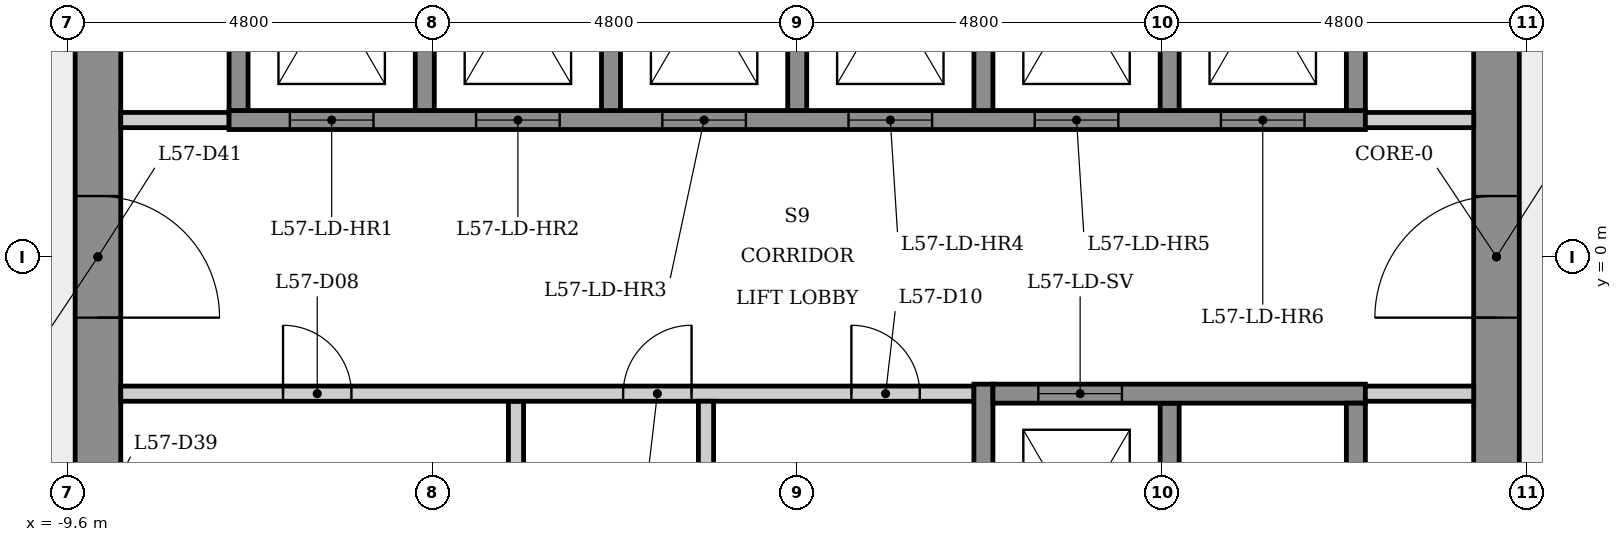
"""IFC4 building model, lengths in metres.
Left out: names, types, materials, properties, quantities, classifications, styles, units other than length and angle.
Written with IfcOpenShell. Run it as: python <this file> out.ifc"""

import sys

from ifc_helpers import new_model, si_unit, direction, frame, frame_2d, origin, place, context, subcontext, project, spatial, rectangle, extrude, element, fill, save


model = new_model("IFC4")
c1 = context("Model", 3, precision=1e-05, world=origin(), true_north=direction((0.0, 1.0)))
c2 = subcontext(c1, "Body", "Model", "MODEL_VIEW")
j1 = project(units=[si_unit("LENGTHUNIT", "METRE"), si_unit("PLANEANGLEUNIT", "RADIAN")], contexts=[c1])
p1 = place(None, origin())
s1 = spatial("IfcSite", under=j1, at=p1, CompositionType="ELEMENT")
p2 = place(p1, origin())
s2 = spatial("IfcBuilding", under=s1, at=p2, CompositionType="ELEMENT")
p3 = place(p2, frame((0.0, 0.0, 214.1)))
s3 = spatial("IfcBuildingStorey", under=s2, at=p3, CompositionType="ELEMENT", Elevation=214.1)
p4 = place(p3, frame((9.2, -5.485, 0.0), z_axis=(0.0, 0.0, 1.0), x_axis=(0.0, 1.0, 0.0)))
e1 = element("IfcWall", 1, at=p4, inside=s3, PredefinedType="SHEAR", context=c2, shape_type="SweptSolid", body=[
    extrude(rectangle(XDim=10.97, YDim=0.6, at=frame_2d((5.485, 0.0))), origin(), (0.0, 0.0, 1.0), 4.8),
])
p5 = place(p4, frame((4.685, 0.0, 0.0)))
e2 = element("IfcOpeningElement", 2, at=p5, cuts=e1, PredefinedType="OPENING", context=c2, shape_type="SweptSolid", body=[
    extrude(rectangle(XDim=1.6, YDim=2.1, at=frame_2d((0.8, 1.05))), frame((0.0, 0.31, 0.0), z_axis=(0.0, -1.0, 0.0), x_axis=(1.0, 0.0, 0.0)), (0.0, 0.0, 1.0), 0.62),
])
p6 = place(p3, frame((-9.2, 5.485, 0.0), z_axis=(0.0, 0.0, 1.0), x_axis=(0.0, -1.0, 0.0)))
e3 = element("IfcWall", 3, at=p6, inside=s3, PredefinedType="SHEAR", context=c2, shape_type="SweptSolid", body=[
    extrude(rectangle(XDim=10.97, YDim=0.6, at=frame_2d((5.485, 0.0))), origin(), (0.0, 0.0, 1.0), 4.8),
])
p7 = place(p6, frame((8.516, 0.0, 0.0)))
e4 = element("IfcOpeningElement", 4, at=p7, cuts=e3, PredefinedType="OPENING", context=c2, shape_type="SweptSolid", body=[
    extrude(rectangle(XDim=0.9, YDim=2.1, at=frame_2d((0.45, 1.05))), frame((0.0, 0.31, 0.0), z_axis=(0.0, -1.0, 0.0), x_axis=(1.0, 0.0, 0.0)), (0.0, 0.0, 1.0), 0.62),
])
p8 = place(p6, frame((4.685, 0.0, 0.0)))
e5 = element("IfcOpeningElement", 5, at=p8, cuts=e3, PredefinedType="OPENING", context=c2, shape_type="SweptSolid", body=[
    extrude(rectangle(XDim=1.6, YDim=2.1, at=frame_2d((0.8, 1.05))), frame((0.0, 0.31, 0.0), z_axis=(0.0, -1.0, 0.0), x_axis=(1.0, 0.0, 0.0)), (0.0, 0.0, 1.0), 0.62),
])
p9 = place(p3, frame((-8.9, 1.8, 0.0), z_axis=(0.0, 0.0, 1.0), x_axis=(1.0, 0.0, 0.0)))
e6 = element("IfcWall", 6, at=p9, inside=s3, PredefinedType="PARTITIONING", context=c2, shape_type="SweptSolid", body=[
    extrude(rectangle(XDim=1.425, YDim=0.2, at=frame_2d((0.712, 0.0))), origin(), (0.0, 0.0, 1.0), 4.45),
])
p10 = place(p3, frame((-7.475, 1.8, 0.0), z_axis=(0.0, 0.0, 1.0), x_axis=(1.0, 0.0, 0.0)))
e7 = element("IfcWall", 7, at=p10, inside=s3, PredefinedType="SHEAR", context=c2, shape_type="SweptSolid", body=[
    extrude(rectangle(XDim=14.95, YDim=0.25, at=frame_2d((7.475, 0.0))), origin(), (0.0, 0.0, 1.0), 4.45),
])
p11 = place(p10, frame((0.8, 0.0, 0.0)))
e8 = element("IfcOpeningElement", 8, at=p11, cuts=e7, PredefinedType="OPENING", context=c2, shape_type="SweptSolid", body=[
    extrude(rectangle(XDim=1.1, YDim=2.1, at=frame_2d((0.55, 1.05))), frame((0.0, 0.135, 0.0), z_axis=(0.0, -1.0, 0.0), x_axis=(1.0, 0.0, 0.0)), (0.0, 0.0, 1.0), 0.27),
])
p12 = place(p10, frame((3.25, 0.0, 0.0)))
e9 = element("IfcOpeningElement", 9, at=p12, cuts=e7, PredefinedType="OPENING", context=c2, shape_type="SweptSolid", body=[
    extrude(rectangle(XDim=1.1, YDim=2.1, at=frame_2d((0.55, 1.05))), frame((0.0, 0.135, 0.0), z_axis=(0.0, -1.0, 0.0), x_axis=(1.0, 0.0, 0.0)), (0.0, 0.0, 1.0), 0.27),
])
p13 = place(p10, frame((5.7, 0.0, 0.0)))
e10 = element("IfcOpeningElement", 10, at=p13, cuts=e7, PredefinedType="OPENING", context=c2, shape_type="SweptSolid", body=[
    extrude(rectangle(XDim=1.1, YDim=2.1, at=frame_2d((0.55, 1.05))), frame((0.0, 0.135, 0.0), z_axis=(0.0, -1.0, 0.0), x_axis=(1.0, 0.0, 0.0)), (0.0, 0.0, 1.0), 0.27),
])
p14 = place(p10, frame((8.15, 0.0, 0.0)))
e11 = element("IfcOpeningElement", 11, at=p14, cuts=e7, PredefinedType="OPENING", context=c2, shape_type="SweptSolid", body=[
    extrude(rectangle(XDim=1.1, YDim=2.1, at=frame_2d((0.55, 1.05))), frame((0.0, 0.135, 0.0), z_axis=(0.0, -1.0, 0.0), x_axis=(1.0, 0.0, 0.0)), (0.0, 0.0, 1.0), 0.27),
])
p15 = place(p10, frame((10.6, 0.0, 0.0)))
e12 = element("IfcOpeningElement", 12, at=p15, cuts=e7, PredefinedType="OPENING", context=c2, shape_type="SweptSolid", body=[
    extrude(rectangle(XDim=1.1, YDim=2.1, at=frame_2d((0.55, 1.05))), frame((0.0, 0.135, 0.0), z_axis=(0.0, -1.0, 0.0), x_axis=(1.0, 0.0, 0.0)), (0.0, 0.0, 1.0), 0.27),
])
p16 = place(p10, frame((13.05, 0.0, 0.0)))
e13 = element("IfcOpeningElement", 13, at=p16, cuts=e7, PredefinedType="OPENING", context=c2, shape_type="SweptSolid", body=[
    extrude(rectangle(XDim=1.1, YDim=2.1, at=frame_2d((0.55, 1.05))), frame((0.0, 0.135, 0.0), z_axis=(0.0, -1.0, 0.0), x_axis=(1.0, 0.0, 0.0)), (0.0, 0.0, 1.0), 0.27),
])
p17 = place(p3, frame((-7.35, 1.925, 0.0), z_axis=(0.0, 0.0, 1.0), x_axis=(0.0, 1.0, 0.0)))
e14 = element("IfcWall", 14, at=p17, inside=s3, PredefinedType="SHEAR", context=c2, shape_type="SweptSolid", body=[
    extrude(rectangle(XDim=4.036, YDim=0.25, at=frame_2d((2.018, 0.0))), origin(), (0.0, 0.0, 1.0), 4.45),
])
p18 = place(p3, frame((-4.9, 5.025, 0.0), z_axis=(0.0, 0.0, 1.0), x_axis=(0.0, -1.0, 0.0)))
e15 = element("IfcWall", 15, at=p18, inside=s3, PredefinedType="SHEAR", context=c2, shape_type="SweptSolid", body=[
    extrude(rectangle(XDim=3.1, YDim=0.25, at=frame_2d((1.55, 0.0))), origin(), (0.0, 0.0, 1.0), 4.8),
])
p19 = place(p3, frame((-3.7, -1.9, 0.0), z_axis=(0.0, 0.0, 1.0), x_axis=(0.0, -1.0, 0.0)))
e16 = element("IfcWall", 16, at=p19, inside=s3, PredefinedType="PARTITIONING", context=c2, shape_type="SweptSolid", body=[
    extrude(rectangle(XDim=3.15, YDim=0.2, at=frame_2d((1.575, 0.0))), origin(), (0.0, 0.0, 1.0), 4.45),
])
p20 = place(p3, frame((-8.9, -1.8, 0.0), z_axis=(0.0, 0.0, 1.0), x_axis=(1.0, 0.0, 0.0)))
e17 = element("IfcWall", 17, at=p20, inside=s3, PredefinedType="PARTITIONING", context=c2, shape_type="SweptSolid", body=[
    extrude(rectangle(XDim=11.225, YDim=0.2, at=frame_2d((5.613, 0.0))), origin(), (0.0, 0.0, 1.0), 4.45),
])
p21 = place(p20, frame((2.135, 0.0, 0.0)))
e18 = element("IfcOpeningElement", 18, at=p21, cuts=e17, PredefinedType="OPENING", context=c2, shape_type="SweptSolid", body=[
    extrude(rectangle(XDim=0.9, YDim=2.1, at=frame_2d((0.45, 1.05))), frame((0.0, 0.11, 0.0), z_axis=(0.0, -1.0, 0.0), x_axis=(1.0, 0.0, 0.0)), (0.0, 0.0, 1.0), 0.22),
])
p22 = place(p20, frame((6.61, 0.0, 0.0)))
e19 = element("IfcOpeningElement", 19, at=p22, cuts=e17, PredefinedType="OPENING", context=c2, shape_type="SweptSolid", body=[
    extrude(rectangle(XDim=0.9, YDim=2.1, at=frame_2d((0.45, 1.05))), frame((0.0, 0.11, 0.0), z_axis=(0.0, -1.0, 0.0), x_axis=(1.0, 0.0, 0.0)), (0.0, 0.0, 1.0), 0.22),
])
p23 = place(p20, frame((9.613, 0.0, 0.0)))
e20 = element("IfcOpeningElement", 20, at=p23, cuts=e17, PredefinedType="OPENING", context=c2, shape_type="SweptSolid", body=[
    extrude(rectangle(XDim=0.9, YDim=2.1, at=frame_2d((0.45, 1.05))), frame((0.0, 0.11, 0.0), z_axis=(0.0, -1.0, 0.0), x_axis=(1.0, 0.0, 0.0)), (0.0, 0.0, 1.0), 0.22),
])
p24 = place(p3, frame((-2.45, 5.025, 0.0), z_axis=(0.0, 0.0, 1.0), x_axis=(0.0, -1.0, 0.0)))
e21 = element("IfcWall", 21, at=p24, inside=s3, PredefinedType="SHEAR", context=c2, shape_type="SweptSolid", body=[
    extrude(rectangle(XDim=3.1, YDim=0.25, at=frame_2d((1.55, 0.0))), origin(), (0.0, 0.0, 1.0), 4.8),
])
p25 = place(p3, frame((-1.2, -1.9, 0.0), z_axis=(0.0, 0.0, 1.0), x_axis=(0.0, -1.0, 0.0)))
e22 = element("IfcWall", 22, at=p25, inside=s3, PredefinedType="PARTITIONING", context=c2, shape_type="SweptSolid", body=[
    extrude(rectangle(XDim=3.15, YDim=0.2, at=frame_2d((1.575, 0.0))), origin(), (0.0, 0.0, 1.0), 4.45),
])
p26 = place(p3, frame((0.0, 5.025, 0.0), z_axis=(0.0, 0.0, 1.0), x_axis=(0.0, -1.0, 0.0)))
e23 = element("IfcWall", 23, at=p26, inside=s3, PredefinedType="SHEAR", context=c2, shape_type="SweptSolid", body=[
    extrude(rectangle(XDim=3.1, YDim=0.25, at=frame_2d((1.55, 0.0))), origin(), (0.0, 0.0, 1.0), 4.8),
])
p27 = place(p3, frame((2.45, -5.275, 0.0), z_axis=(0.0, 0.0, 1.0), x_axis=(0.0, 1.0, 0.0)))
e24 = element("IfcWall", 24, at=p27, inside=s3, PredefinedType="SHEAR", context=c2, shape_type="SweptSolid", body=[
    extrude(rectangle(XDim=3.6, YDim=0.25, at=frame_2d((1.8, 0.0))), origin(), (0.0, 0.0, 1.0), 4.45),
])
for number, where, z_axis, x_axis in (
    (25, (2.45, 5.025, 0.0), (0.0, 0.0, 1.0), (0.0, -1.0, 0.0)),
    (26, (4.9, -1.925, 0.0), (0.0, 0.0, 1.0), (0.0, -1.0, 0.0)),
    (27, (4.9, 5.025, 0.0), (0.0, 0.0, 1.0), (0.0, -1.0, 0.0)),
):
    element("IfcWall", number, at=place(p3, frame(where, z_axis=z_axis, x_axis=x_axis)), inside=s3, PredefinedType="SHEAR", context=c2, shape_type="SweptSolid", body=[
        extrude(rectangle(XDim=3.1, YDim=0.25, at=frame_2d((1.55, 0.0))), origin(), (0.0, 0.0, 1.0), 4.8),
    ])
p28 = place(p3, frame((2.575, -1.8, 0.0), z_axis=(0.0, 0.0, 1.0), x_axis=(1.0, 0.0, 0.0)))
e28 = element("IfcWall", 28, at=p28, inside=s3, PredefinedType="SHEAR", context=c2, shape_type="SweptSolid", body=[
    extrude(rectangle(XDim=4.9, YDim=0.25, at=frame_2d((2.45, 0.0))), origin(), (0.0, 0.0, 1.0), 4.45),
])
p29 = place(p28, frame((0.597, 0.0, 0.0)))
e29 = element("IfcOpeningElement", 29, at=p29, cuts=e28, PredefinedType="OPENING", context=c2, shape_type="SweptSolid", body=[
    extrude(rectangle(XDim=1.1, YDim=2.1, at=frame_2d((0.55, 1.05))), frame((0.0, 0.135, 0.0), z_axis=(0.0, -1.0, 0.0), x_axis=(1.0, 0.0, 0.0)), (0.0, 0.0, 1.0), 0.27),
])
p30 = place(p3, frame((7.475, 1.8, 0.0), z_axis=(0.0, 0.0, 1.0), x_axis=(1.0, 0.0, 0.0)))
e30 = element("IfcWall", 30, at=p30, inside=s3, PredefinedType="PARTITIONING", context=c2, shape_type="SweptSolid", body=[
    extrude(rectangle(XDim=1.425, YDim=0.2, at=frame_2d((0.712, 0.0))), origin(), (0.0, 0.0, 1.0), 4.45),
])
for number, where, z_axis, x_axis in (
    (31, (7.35, -1.925, 0.0), (0.0, 0.0, 1.0), (0.0, -1.0, 0.0)),
    (32, (7.35, 5.025, 0.0), (0.0, 0.0, 1.0), (0.0, -1.0, 0.0)),
):
    element("IfcWall", number, at=place(p3, frame(where, z_axis=z_axis, x_axis=x_axis)), inside=s3, PredefinedType="SHEAR", context=c2, shape_type="SweptSolid", body=[
        extrude(rectangle(XDim=3.1, YDim=0.25, at=frame_2d((1.55, 0.0))), origin(), (0.0, 0.0, 1.0), 4.8),
    ])
p31 = place(p3, frame((8.9, -1.8, 0.0), z_axis=(0.0, 0.0, 1.0), x_axis=(-1.0, 0.0, 0.0)))
e33 = element("IfcWall", 33, at=p31, inside=s3, PredefinedType="PARTITIONING", context=c2, shape_type="SweptSolid", body=[
    extrude(rectangle(XDim=1.425, YDim=0.2, at=frame_2d((0.712, 0.0))), origin(), (0.0, 0.0, 1.0), 4.45),
])
p32 = place(p11, origin())
e34 = element("IfcDoor", 34, at=p32, inside=s3, OperationType="SLIDING_TO_LEFT", PredefinedType="DOOR", context=c2, shape_type="SweptSolid", body=[
    extrude(rectangle(XDim=1.1, YDim=2.1, at=frame_2d((0.55, 1.05))), frame((0.0, 0.025, 0.0), z_axis=(0.0, -1.0, 0.0), x_axis=(1.0, 0.0, 0.0)), (0.0, 0.0, 1.0), 0.05),
])
fill(e8, e34)
p33 = place(p12, origin())
e35 = element("IfcDoor", 35, at=p33, inside=s3, OperationType="SLIDING_TO_LEFT", PredefinedType="DOOR", context=c2, shape_type="SweptSolid", body=[
    extrude(rectangle(XDim=1.1, YDim=2.1, at=frame_2d((0.55, 1.05))), frame((0.0, 0.025, 0.0), z_axis=(0.0, -1.0, 0.0), x_axis=(1.0, 0.0, 0.0)), (0.0, 0.0, 1.0), 0.05),
])
fill(e9, e35)
p34 = place(p13, origin())
e36 = element("IfcDoor", 36, at=p34, inside=s3, OperationType="SLIDING_TO_LEFT", PredefinedType="DOOR", context=c2, shape_type="SweptSolid", body=[
    extrude(rectangle(XDim=1.1, YDim=2.1, at=frame_2d((0.55, 1.05))), frame((0.0, 0.025, 0.0), z_axis=(0.0, -1.0, 0.0), x_axis=(1.0, 0.0, 0.0)), (0.0, 0.0, 1.0), 0.05),
])
fill(e10, e36)
p35 = place(p14, origin())
e37 = element("IfcDoor", 37, at=p35, inside=s3, OperationType="SLIDING_TO_LEFT", PredefinedType="DOOR", context=c2, shape_type="SweptSolid", body=[
    extrude(rectangle(XDim=1.1, YDim=2.1, at=frame_2d((0.55, 1.05))), frame((0.0, 0.025, 0.0), z_axis=(0.0, -1.0, 0.0), x_axis=(1.0, 0.0, 0.0)), (0.0, 0.0, 1.0), 0.05),
])
fill(e11, e37)
p36 = place(p15, origin())
e38 = element("IfcDoor", 38, at=p36, inside=s3, OperationType="SLIDING_TO_LEFT", PredefinedType="DOOR", context=c2, shape_type="SweptSolid", body=[
    extrude(rectangle(XDim=1.1, YDim=2.1, at=frame_2d((0.55, 1.05))), frame((0.0, 0.025, 0.0), z_axis=(0.0, -1.0, 0.0), x_axis=(1.0, 0.0, 0.0)), (0.0, 0.0, 1.0), 0.05),
])
fill(e12, e38)
p37 = place(p16, origin())
e39 = element("IfcDoor", 39, at=p37, inside=s3, OperationType="SLIDING_TO_LEFT", PredefinedType="DOOR", context=c2, shape_type="SweptSolid", body=[
    extrude(rectangle(XDim=1.1, YDim=2.1, at=frame_2d((0.55, 1.05))), frame((0.0, 0.025, 0.0), z_axis=(0.0, -1.0, 0.0), x_axis=(1.0, 0.0, 0.0)), (0.0, 0.0, 1.0), 0.05),
])
fill(e13, e39)
p38 = place(p29, origin())
e40 = element("IfcDoor", 40, at=p38, inside=s3, OperationType="SLIDING_TO_LEFT", PredefinedType="DOOR", context=c2, shape_type="SweptSolid", body=[
    extrude(rectangle(XDim=1.1, YDim=2.1, at=frame_2d((0.55, 1.05))), frame((0.0, 0.025, 0.0), z_axis=(0.0, -1.0, 0.0), x_axis=(1.0, 0.0, 0.0)), (0.0, 0.0, 1.0), 0.05),
])
fill(e29, e40)
p39 = place(p21, origin())
e41 = element("IfcDoor", 41, at=p39, inside=s3, OperationType="SINGLE_SWING_LEFT", PredefinedType="DOOR", context=c2, shape_type="SweptSolid", body=[
    extrude(rectangle(XDim=0.9, YDim=2.1, at=frame_2d((0.45, 1.05))), frame((0.0, 0.025, 0.0), z_axis=(0.0, -1.0, 0.0), x_axis=(1.0, 0.0, 0.0)), (0.0, 0.0, 1.0), 0.05),
])
fill(e18, e41)
p40 = place(p22, origin())
e42 = element("IfcDoor", 42, at=p40, inside=s3, OperationType="SINGLE_SWING_RIGHT", PredefinedType="DOOR", context=c2, shape_type="SweptSolid", body=[
    extrude(rectangle(XDim=0.9, YDim=2.1, at=frame_2d((0.45, 1.05))), frame((0.0, 0.025, 0.0), z_axis=(0.0, -1.0, 0.0), x_axis=(1.0, 0.0, 0.0)), (0.0, 0.0, 1.0), 0.05),
])
fill(e19, e42)
p41 = place(p23, origin())
e43 = element("IfcDoor", 43, at=p41, inside=s3, OperationType="SINGLE_SWING_LEFT", PredefinedType="DOOR", context=c2, shape_type="SweptSolid", body=[
    extrude(rectangle(XDim=0.9, YDim=2.1, at=frame_2d((0.45, 1.05))), frame((0.0, 0.025, 0.0), z_axis=(0.0, -1.0, 0.0), x_axis=(1.0, 0.0, 0.0)), (0.0, 0.0, 1.0), 0.05),
])
fill(e20, e43)
p42 = place(p5, origin())
e44 = element("IfcDoor", 44, at=p42, inside=s3, OperationType="SINGLE_SWING_LEFT", PredefinedType="DOOR", context=c2, shape_type="SweptSolid", body=[
    extrude(rectangle(XDim=1.6, YDim=2.1, at=frame_2d((0.8, 1.05))), frame((0.0, 0.025, 0.0), z_axis=(0.0, -1.0, 0.0), x_axis=(1.0, 0.0, 0.0)), (0.0, 0.0, 1.0), 0.05),
])
fill(e2, e44)
p43 = place(p8, origin())
e45 = element("IfcDoor", 45, at=p43, inside=s3, OperationType="SINGLE_SWING_RIGHT", PredefinedType="DOOR", context=c2, shape_type="SweptSolid", body=[
    extrude(rectangle(XDim=1.6, YDim=2.1, at=frame_2d((0.8, 1.05))), frame((0.0, 0.025, 0.0), z_axis=(0.0, -1.0, 0.0), x_axis=(1.0, 0.0, 0.0)), (0.0, 0.0, 1.0), 0.05),
])
fill(e5, e45)
save(model, sys.argv[1])
